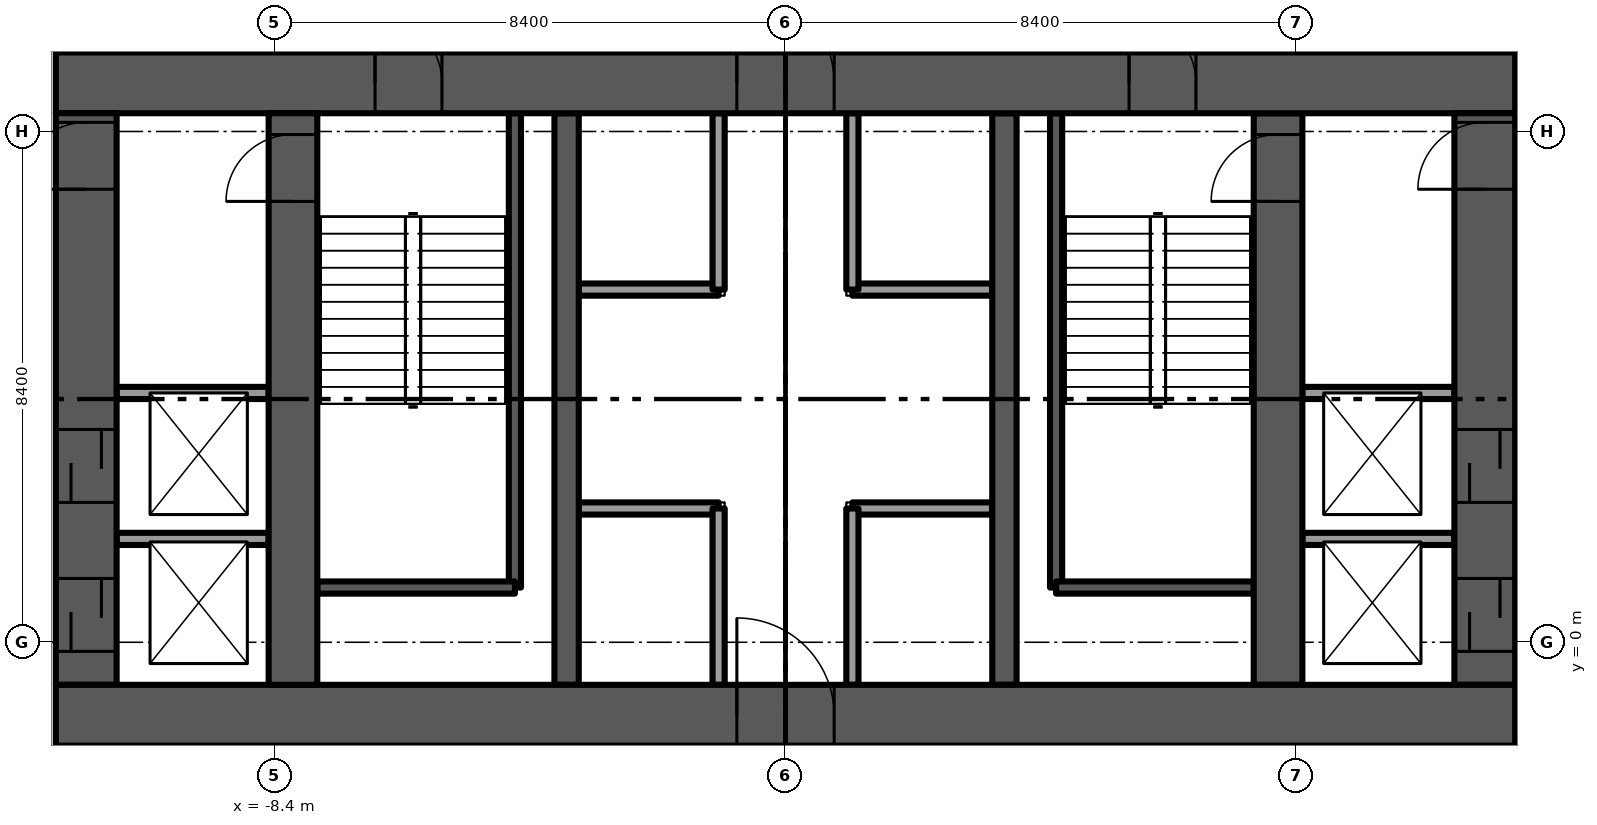
"""IFC4 building model, lengths in metres.
Left out: names, types, materials, properties, quantities, classifications, styles, units other than length and angle.
Written with IfcOpenShell. Run it as: python <this file> out.ifc"""

import sys

from ifc_helpers import new_model, si_unit, direction, frame, frame_2d, origin, place, context, subcontext, project, spatial, rectangle, extrude, element, fill, save


model = new_model("IFC4")
c1 = context("Model", 3, precision=1e-05, world=origin(), true_north=direction((0.0, 1.0)))
c2 = subcontext(c1, "Body", "Model", "MODEL_VIEW")
j1 = project(units=[si_unit("LENGTHUNIT", "METRE"), si_unit("PLANEANGLEUNIT", "RADIAN")], contexts=[c1])
p1 = place(None, origin())
s1 = spatial("IfcSite", under=j1, at=p1, CompositionType="ELEMENT")
p2 = place(p1, origin())
s2 = spatial("IfcBuilding", under=s1, at=p2, CompositionType="ELEMENT")
p3 = place(p2, frame((0.0, 0.0, 108.0)))
s3 = spatial("IfcBuildingStorey", under=s2, at=p3, CompositionType="ELEMENT", Elevation=108.0)
p4 = place(p3, frame((-12.0, -1.2, -0.3), z_axis=(0.0, 0.0, 1.0), x_axis=(1.0, 0.0, 0.0)))
e1 = element("IfcWall", 1, at=p4, inside=s3, PredefinedType="SHEAR", context=c2, shape_type="SweptSolid", body=[
    extrude(rectangle(XDim=24.0, YDim=1.0, at=frame_2d((12.0, 0.0))), origin(), (0.0, 0.0, 1.0), 8.0),
])
p5 = place(p4, frame((11.2, 0.0, 0.0)))
e2 = element("IfcOpeningElement", 2, at=p5, cuts=e1, PredefinedType="OPENING", context=c2, shape_type="SweptSolid", body=[
    extrude(rectangle(XDim=1.6, YDim=2.1, at=frame_2d((0.8, 1.05))), frame((0.0, 0.5, 0.0), z_axis=(0.0, -1.0, 0.0), x_axis=(1.0, 0.0, 0.0)), (0.0, 0.0, 1.0), 1.0),
])
p6 = place(p3, frame((-12.0, 9.2, -0.3), z_axis=(0.0, 0.0, 1.0), x_axis=(1.0, 0.0, 0.0)))
e3 = element("IfcWall", 3, at=p6, inside=s3, PredefinedType="SHEAR", context=c2, shape_type="SweptSolid", body=[
    extrude(rectangle(XDim=24.0, YDim=1.0, at=frame_2d((12.0, 0.0))), origin(), (0.0, 0.0, 1.0), 8.0),
])
p7 = place(p6, frame((11.2, 0.0, 0.0)))
e4 = element("IfcOpeningElement", 4, at=p7, cuts=e3, PredefinedType="OPENING", context=c2, shape_type="SweptSolid", body=[
    extrude(rectangle(XDim=1.6, YDim=2.1, at=frame_2d((0.8, 1.05))), frame((0.0, 0.5, 0.0), z_axis=(0.0, -1.0, 0.0), x_axis=(1.0, 0.0, 0.0)), (0.0, 0.0, 1.0), 1.0),
])
p8 = place(p6, frame((5.25, 0.0, 0.0)))
e5 = element("IfcOpeningElement", 5, at=p8, cuts=e3, PredefinedType="OPENING", context=c2, shape_type="SweptSolid", body=[
    extrude(rectangle(XDim=1.1, YDim=2.1, at=frame_2d((0.55, 1.05))), frame((0.0, 0.5, 0.0), z_axis=(0.0, -1.0, 0.0), x_axis=(1.0, 0.0, 0.0)), (0.0, 0.0, 1.0), 1.0),
])
p9 = place(p6, frame((17.65, 0.0, 0.0)))
e6 = element("IfcOpeningElement", 6, at=p9, cuts=e3, PredefinedType="OPENING", context=c2, shape_type="SweptSolid", body=[
    extrude(rectangle(XDim=1.1, YDim=2.1, at=frame_2d((0.55, 1.05))), frame((0.0, 0.5, 0.0), z_axis=(0.0, -1.0, 0.0), x_axis=(1.0, 0.0, 0.0)), (0.0, 0.0, 1.0), 1.0),
])
p10 = place(p3, frame((-8.1, -0.7, -0.3), z_axis=(0.0, 0.0, 1.0), x_axis=(0.0, 1.0, 0.0)))
e7 = element("IfcWall", 7, at=p10, inside=s3, PredefinedType="SHEAR", context=c2, shape_type="SweptSolid", body=[
    extrude(rectangle(XDim=9.4, YDim=0.8, at=frame_2d((4.7, 0.0))), origin(), (0.0, 0.0, 1.0), 8.0),
])
p11 = place(p10, frame((7.95, 0.0, 0.0)))
e8 = element("IfcOpeningElement", 8, at=p11, cuts=e7, PredefinedType="OPENING", context=c2, shape_type="SweptSolid", body=[
    extrude(rectangle(XDim=1.1, YDim=2.1, at=frame_2d((0.55, 1.05))), frame((0.0, 0.4, 0.0), z_axis=(0.0, -1.0, 0.0), x_axis=(1.0, 0.0, 0.0)), (0.0, 0.0, 1.0), 0.8),
])
p12 = place(p3, frame((8.1, -0.7, -0.3), z_axis=(0.0, 0.0, 1.0), x_axis=(0.0, 1.0, 0.0)))
e9 = element("IfcWall", 9, at=p12, inside=s3, PredefinedType="SHEAR", context=c2, shape_type="SweptSolid", body=[
    extrude(rectangle(XDim=9.4, YDim=0.8, at=frame_2d((4.7, 0.0))), origin(), (0.0, 0.0, 1.0), 8.0),
])
p13 = place(p12, frame((7.95, 0.0, 0.0)))
e10 = element("IfcOpeningElement", 10, at=p13, cuts=e9, PredefinedType="OPENING", context=c2, shape_type="SweptSolid", body=[
    extrude(rectangle(XDim=1.1, YDim=2.1, at=frame_2d((0.55, 1.05))), frame((0.0, 0.4, 0.0), z_axis=(0.0, -1.0, 0.0), x_axis=(1.0, 0.0, 0.0)), (0.0, 0.0, 1.0), 0.8),
])
for number, where, z_axis, x_axis in (
    (11, (-3.6, -0.7, -0.3), (0.0, 0.0, 1.0), (0.0, 1.0, 0.0)),
    (12, (3.6, -0.7, -0.3), (0.0, 0.0, 1.0), (0.0, 1.0, 0.0)),
):
    element("IfcWall", number, at=place(p3, frame(where, z_axis=z_axis, x_axis=x_axis)), inside=s3, PredefinedType="SHEAR", context=c2, shape_type="SweptSolid", body=[
        extrude(rectangle(XDim=9.4, YDim=0.4, at=frame_2d((4.7, 0.0))), origin(), (0.0, 0.0, 1.0), 8.0),
    ])
p14 = place(p3, frame((-11.5, -0.7, -0.3), z_axis=(0.0, 0.0, 1.0), x_axis=(0.0, 1.0, 0.0)))
e13 = element("IfcWall", 13, at=p14, inside=s3, PredefinedType="SHEAR", context=c2, shape_type="SweptSolid", body=[
    extrude(rectangle(XDim=9.4, YDim=1.0, at=frame_2d((4.7, 0.0))), origin(), (0.0, 0.0, 1.0), 8.0),
])
p15 = place(p14, frame((8.15, 0.0, 0.0)))
e14 = element("IfcOpeningElement", 14, at=p15, cuts=e13, PredefinedType="OPENING", context=c2, shape_type="SweptSolid", body=[
    extrude(rectangle(XDim=1.1, YDim=2.1, at=frame_2d((0.55, 1.05))), frame((0.0, 0.5, 0.0), z_axis=(0.0, -1.0, 0.0), x_axis=(1.0, 0.0, 0.0)), (0.0, 0.0, 1.0), 1.0),
])
p16 = place(p14, frame((0.55, 0.0, 0.0)))
e15 = element("IfcOpeningElement", 15, at=p16, cuts=e13, PredefinedType="OPENING", context=c2, shape_type="SweptSolid", body=[
    extrude(rectangle(XDim=1.2, YDim=2.1, at=frame_2d((0.6, 1.05))), frame((0.0, 0.5, 0.0), z_axis=(0.0, -1.0, 0.0), x_axis=(1.0, 0.0, 0.0)), (0.0, 0.0, 1.0), 1.0),
])
p17 = place(p14, frame((3.0, 0.0, 0.0)))
e16 = element("IfcOpeningElement", 16, at=p17, cuts=e13, PredefinedType="OPENING", context=c2, shape_type="SweptSolid", body=[
    extrude(rectangle(XDim=1.2, YDim=2.1, at=frame_2d((0.6, 1.05))), frame((0.0, 0.5, 0.0), z_axis=(0.0, -1.0, 0.0), x_axis=(1.0, 0.0, 0.0)), (0.0, 0.0, 1.0), 1.0),
])
p18 = place(p3, frame((11.5, -0.7, -0.3), z_axis=(0.0, 0.0, 1.0), x_axis=(0.0, 1.0, 0.0)))
e17 = element("IfcWall", 17, at=p18, inside=s3, PredefinedType="SHEAR", context=c2, shape_type="SweptSolid", body=[
    extrude(rectangle(XDim=9.4, YDim=1.0, at=frame_2d((4.7, 0.0))), origin(), (0.0, 0.0, 1.0), 8.0),
])
p19 = place(p18, frame((8.15, 0.0, 0.0)))
e18 = element("IfcOpeningElement", 18, at=p19, cuts=e17, PredefinedType="OPENING", context=c2, shape_type="SweptSolid", body=[
    extrude(rectangle(XDim=1.1, YDim=2.1, at=frame_2d((0.55, 1.05))), frame((0.0, 0.5, 0.0), z_axis=(0.0, -1.0, 0.0), x_axis=(1.0, 0.0, 0.0)), (0.0, 0.0, 1.0), 1.0),
])
p20 = place(p18, frame((0.55, 0.0, 0.0)))
e19 = element("IfcOpeningElement", 19, at=p20, cuts=e17, PredefinedType="OPENING", context=c2, shape_type="SweptSolid", body=[
    extrude(rectangle(XDim=1.2, YDim=2.1, at=frame_2d((0.6, 1.05))), frame((0.0, 0.5, 0.0), z_axis=(0.0, -1.0, 0.0), x_axis=(1.0, 0.0, 0.0)), (0.0, 0.0, 1.0), 1.0),
])
p21 = place(p18, frame((3.0, 0.0, 0.0)))
e20 = element("IfcOpeningElement", 20, at=p21, cuts=e17, PredefinedType="OPENING", context=c2, shape_type="SweptSolid", body=[
    extrude(rectangle(XDim=1.2, YDim=2.1, at=frame_2d((0.6, 1.05))), frame((0.0, 0.5, 0.0), z_axis=(0.0, -1.0, 0.0), x_axis=(1.0, 0.0, 0.0)), (0.0, 0.0, 1.0), 1.0),
])
for number, where, z_axis, x_axis in (
    (21, (-3.4, 2.2, 0.0), (0.0, 0.0, 1.0), (1.0, 0.0, 0.0)),
    (22, (-3.4, 5.8, 0.0), (0.0, 0.0, 1.0), (1.0, 0.0, 0.0)),
    (23, (1.1, 2.2, 0.0), (0.0, 0.0, 1.0), (1.0, 0.0, 0.0)),
    (24, (1.1, 5.8, 0.0), (0.0, 0.0, 1.0), (1.0, 0.0, 0.0)),
):
    element("IfcWall", number, at=place(p3, frame(where, z_axis=z_axis, x_axis=x_axis)), inside=s3, PredefinedType="PARTITIONING", context=c2, shape_type="SweptSolid", body=[
        extrude(rectangle(XDim=2.3, YDim=0.2, at=frame_2d((1.15, 0.0))), origin(), (0.0, 0.0, 1.0), 7.7),
    ])
for number, where, z_axis, x_axis in (
    (25, (-1.1, -0.7, 0.0), (0.0, 0.0, 1.0), (0.0, 1.0, 0.0)),
    (26, (1.1, -0.7, 0.0), (0.0, 0.0, 1.0), (0.0, 1.0, 0.0)),
    (27, (-1.1, 5.8, 0.0), (0.0, 0.0, 1.0), (0.0, 1.0, 0.0)),
    (28, (1.1, 5.8, 0.0), (0.0, 0.0, 1.0), (0.0, 1.0, 0.0)),
):
    element("IfcWall", number, at=place(p3, frame(where, z_axis=z_axis, x_axis=x_axis)), inside=s3, PredefinedType="PARTITIONING", context=c2, shape_type="SweptSolid", body=[
        extrude(rectangle(XDim=2.9, YDim=0.2, at=frame_2d((1.45, 0.0))), origin(), (0.0, 0.0, 1.0), 7.7),
    ])
p22 = place(p3, frame((-4.45, 0.9, -0.3), z_axis=(0.0, 0.0, 1.0), x_axis=(0.0, 1.0, 0.0)))
e29 = element("IfcWall", 29, at=p22, inside=s3, PredefinedType="SOLIDWALL", context=c2, shape_type="SweptSolid", body=[
    extrude(rectangle(XDim=7.8, YDim=0.2, at=frame_2d((3.9, 0.0))), origin(), (0.0, 0.0, 1.0), 8.0),
])
p23 = place(p3, frame((-7.7, 0.9, -0.3), z_axis=(0.0, 0.0, 1.0), x_axis=(1.0, 0.0, 0.0)))
e30 = element("IfcWall", 30, at=p23, inside=s3, PredefinedType="SOLIDWALL", context=c2, shape_type="SweptSolid", body=[
    extrude(rectangle(XDim=3.25, YDim=0.2, at=frame_2d((1.625, 0.0))), origin(), (0.0, 0.0, 1.0), 8.0),
])
p24 = place(p3, frame((4.45, 0.9, -0.3), z_axis=(0.0, 0.0, 1.0), x_axis=(0.0, 1.0, 0.0)))
e31 = element("IfcWall", 31, at=p24, inside=s3, PredefinedType="SOLIDWALL", context=c2, shape_type="SweptSolid", body=[
    extrude(rectangle(XDim=7.8, YDim=0.2, at=frame_2d((3.9, 0.0))), origin(), (0.0, 0.0, 1.0), 8.0),
])
p25 = place(p3, frame((4.45, 0.9, -0.3), z_axis=(0.0, 0.0, 1.0), x_axis=(1.0, 0.0, 0.0)))
e32 = element("IfcWall", 32, at=p25, inside=s3, PredefinedType="SOLIDWALL", context=c2, shape_type="SweptSolid", body=[
    extrude(rectangle(XDim=3.25, YDim=0.2, at=frame_2d((1.625, 0.0))), origin(), (0.0, 0.0, 1.0), 8.0),
])
for number, where, z_axis, x_axis in (
    (33, (-11.0, 1.7, 0.0), (0.0, 0.0, 1.0), (1.0, 0.0, 0.0)),
    (34, (-11.0, 4.1, 0.0), (0.0, 0.0, 1.0), (1.0, 0.0, 0.0)),
    (35, (8.5, 1.7, 0.0), (0.0, 0.0, 1.0), (1.0, 0.0, 0.0)),
    (36, (8.5, 4.1, 0.0), (0.0, 0.0, 1.0), (1.0, 0.0, 0.0)),
):
    element("IfcWall", number, at=place(p3, frame(where, z_axis=z_axis, x_axis=x_axis)), inside=s3, PredefinedType="PARTITIONING", context=c2, shape_type="SweptSolid", body=[
        extrude(rectangle(XDim=2.5, YDim=0.2, at=frame_2d((1.25, 0.0))), origin(), (0.0, 0.0, 1.0), 7.7),
    ])
p26 = place(p5, origin())
e37 = element("IfcDoor", 37, at=p26, inside=s3, OperationType="DOUBLE_DOOR_SINGLE_SWING", PredefinedType="DOOR", context=c2, shape_type="SweptSolid", body=[
    extrude(rectangle(XDim=1.6, YDim=2.1, at=frame_2d((0.8, 1.05))), frame((0.0, 0.025, 0.0), z_axis=(0.0, -1.0, 0.0), x_axis=(1.0, 0.0, 0.0)), (0.0, 0.0, 1.0), 0.05),
])
fill(e2, e37)
p27 = place(p7, origin())
e38 = element("IfcDoor", 38, at=p27, inside=s3, OperationType="DOUBLE_DOOR_SINGLE_SWING", PredefinedType="DOOR", context=c2, shape_type="SweptSolid", body=[
    extrude(rectangle(XDim=1.6, YDim=2.1, at=frame_2d((0.8, 1.05))), frame((0.0, 0.025, 0.0), z_axis=(0.0, -1.0, 0.0), x_axis=(1.0, 0.0, 0.0)), (0.0, 0.0, 1.0), 0.05),
])
fill(e4, e38)
p28 = place(p8, origin())
e39 = element("IfcDoor", 39, at=p28, inside=s3, OperationType="SINGLE_SWING_LEFT", PredefinedType="DOOR", context=c2, shape_type="SweptSolid", body=[
    extrude(rectangle(XDim=1.1, YDim=2.1, at=frame_2d((0.55, 1.05))), frame((0.0, 0.025, 0.0), z_axis=(0.0, -1.0, 0.0), x_axis=(1.0, 0.0, 0.0)), (0.0, 0.0, 1.0), 0.05),
])
fill(e5, e39)
p29 = place(p11, origin())
e40 = element("IfcDoor", 40, at=p29, inside=s3, OperationType="SINGLE_SWING_RIGHT", PredefinedType="DOOR", context=c2, shape_type="SweptSolid", body=[
    extrude(rectangle(XDim=1.1, YDim=2.1, at=frame_2d((0.55, 1.05))), frame((0.0, 0.025, 0.0), z_axis=(0.0, -1.0, 0.0), x_axis=(1.0, 0.0, 0.0)), (0.0, 0.0, 1.0), 0.05),
])
fill(e8, e40)
p30 = place(p9, origin())
e41 = element("IfcDoor", 41, at=p30, inside=s3, OperationType="SINGLE_SWING_RIGHT", PredefinedType="DOOR", context=c2, shape_type="SweptSolid", body=[
    extrude(rectangle(XDim=1.1, YDim=2.1, at=frame_2d((0.55, 1.05))), frame((0.0, 0.025, 0.0), z_axis=(0.0, -1.0, 0.0), x_axis=(1.0, 0.0, 0.0)), (0.0, 0.0, 1.0), 0.05),
])
fill(e6, e41)
p31 = place(p13, origin())
e42 = element("IfcDoor", 42, at=p31, inside=s3, OperationType="SINGLE_SWING_LEFT", PredefinedType="DOOR", context=c2, shape_type="SweptSolid", body=[
    extrude(rectangle(XDim=1.1, YDim=2.1, at=frame_2d((0.55, 1.05))), frame((0.0, 0.025, 0.0), z_axis=(0.0, -1.0, 0.0), x_axis=(1.0, 0.0, 0.0)), (0.0, 0.0, 1.0), 0.05),
])
fill(e10, e42)
p32 = place(p15, origin())
e43 = element("IfcDoor", 43, at=p32, inside=s3, OperationType="SINGLE_SWING_LEFT", PredefinedType="DOOR", context=c2, shape_type="SweptSolid", body=[
    extrude(rectangle(XDim=1.1, YDim=2.1, at=frame_2d((0.55, 1.05))), frame((0.0, 0.025, 0.0), z_axis=(0.0, -1.0, 0.0), x_axis=(1.0, 0.0, 0.0)), (0.0, 0.0, 1.0), 0.05),
])
fill(e14, e43)
p33 = place(p16, origin())
e44 = element("IfcDoor", 44, at=p33, inside=s3, OperationType="SLIDING_TO_LEFT", PredefinedType="DOOR", context=c2, shape_type="SweptSolid", body=[
    extrude(rectangle(XDim=1.2, YDim=2.1, at=frame_2d((0.6, 1.05))), frame((0.0, 0.025, 0.0), z_axis=(0.0, -1.0, 0.0), x_axis=(1.0, 0.0, 0.0)), (0.0, 0.0, 1.0), 0.05),
])
fill(e15, e44)
p34 = place(p17, origin())
e45 = element("IfcDoor", 45, at=p34, inside=s3, OperationType="SLIDING_TO_LEFT", PredefinedType="DOOR", context=c2, shape_type="SweptSolid", body=[
    extrude(rectangle(XDim=1.2, YDim=2.1, at=frame_2d((0.6, 1.05))), frame((0.0, 0.025, 0.0), z_axis=(0.0, -1.0, 0.0), x_axis=(1.0, 0.0, 0.0)), (0.0, 0.0, 1.0), 0.05),
])
fill(e16, e45)
p35 = place(p19, origin())
e46 = element("IfcDoor", 46, at=p35, inside=s3, OperationType="SINGLE_SWING_RIGHT", PredefinedType="DOOR", context=c2, shape_type="SweptSolid", body=[
    extrude(rectangle(XDim=1.1, YDim=2.1, at=frame_2d((0.55, 1.05))), frame((0.0, 0.025, 0.0), z_axis=(0.0, -1.0, 0.0), x_axis=(1.0, 0.0, 0.0)), (0.0, 0.0, 1.0), 0.05),
])
fill(e18, e46)
p36 = place(p20, origin())
e47 = element("IfcDoor", 47, at=p36, inside=s3, OperationType="SLIDING_TO_LEFT", PredefinedType="DOOR", context=c2, shape_type="SweptSolid", body=[
    extrude(rectangle(XDim=1.2, YDim=2.1, at=frame_2d((0.6, 1.05))), frame((0.0, 0.025, 0.0), z_axis=(0.0, -1.0, 0.0), x_axis=(1.0, 0.0, 0.0)), (0.0, 0.0, 1.0), 0.05),
])
fill(e19, e47)
p37 = place(p21, origin())
e48 = element("IfcDoor", 48, at=p37, inside=s3, OperationType="SLIDING_TO_LEFT", PredefinedType="DOOR", context=c2, shape_type="SweptSolid", body=[
    extrude(rectangle(XDim=1.2, YDim=2.1, at=frame_2d((0.6, 1.05))), frame((0.0, 0.025, 0.0), z_axis=(0.0, -1.0, 0.0), x_axis=(1.0, 0.0, 0.0)), (0.0, 0.0, 1.0), 0.05),
])
fill(e20, e48)
save(model, sys.argv[1])
